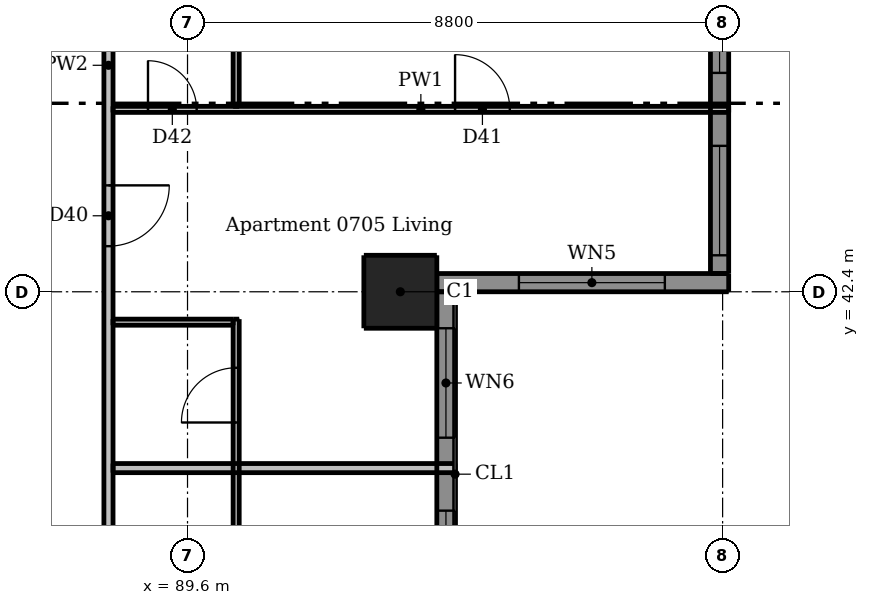
"""IFC4 building model, lengths in metres.
Left out: names, types, materials, properties, quantities, classifications, styles, units other than length and angle.
Written with IfcOpenShell. Run it as: python <this file> out.ifc"""

import sys

from ifc_helpers import new_model, si_unit, direction, frame, frame_2d, origin, origin_2d, place, context, subcontext, project, spatial, rectangle, extrude, element, fill, save


model = new_model("IFC4")
c1 = context("Model", 3, precision=1e-05, world=origin(), true_north=direction((0.0, 1.0)))
c2 = subcontext(c1, "Body", "Model", "MODEL_VIEW")
j1 = project(units=[si_unit("LENGTHUNIT", "METRE"), si_unit("PLANEANGLEUNIT", "RADIAN")], contexts=[c1])
p1 = place(None, origin())
s1 = spatial("IfcSite", under=j1, at=p1, CompositionType="ELEMENT")
p2 = place(p1, origin())
s2 = spatial("IfcBuilding", under=s1, at=p2, CompositionType="ELEMENT")
p3 = place(p2, frame((0.0, 0.0, 30.1)))
s3 = spatial("IfcBuildingStorey", under=s2, at=p3, CompositionType="ELEMENT", Elevation=30.1)
p4 = place(p3, frame((93.1, 42.4, 0.0), z_axis=(0.0, 0.0, 1.0), x_axis=(1.0, 0.0, 0.0)))
e1 = element("IfcColumn", 1, at=p4, inside=s3, PredefinedType="COLUMN", context=c2, shape_type="SweptSolid", body=[
    extrude(rectangle(XDim=1.2, YDim=1.2, at=origin_2d()), origin(), (0.0, 0.0, 1.0), 3.05),
])
p5 = place(p3, frame((93.7, 42.55, 0.0), z_axis=(0.0, 0.0, 1.0), x_axis=(1.0, 0.0, 0.0)))
e2 = element("IfcWall", 2, at=p5, inside=s3, PredefinedType="SOLIDWALL", context=c2, shape_type="SweptSolid", body=[
    extrude(rectangle(XDim=4.8, YDim=0.3, at=frame_2d((2.4, 0.0))), origin(), (0.0, 0.0, 1.0), 3.05),
])
p6 = place(p5, frame((1.35, 0.0, 0.15)))
e3 = element("IfcOpeningElement", 3, at=p6, cuts=e2, PredefinedType="OPENING", context=c2, shape_type="SweptSolid", body=[
    extrude(rectangle(XDim=2.4, YDim=2.1, at=frame_2d((1.2, 1.05))), frame((0.0, 0.16, 0.0), z_axis=(0.0, -1.0, 0.0), x_axis=(1.0, 0.0, 0.0)), (0.0, 0.0, 1.0), 0.32),
])
p7 = place(p3, frame((93.85, 36.49, 0.0), z_axis=(0.0, 0.0, 1.0), x_axis=(0.0, 1.0, 0.0)))
e4 = element("IfcWall", 4, at=p7, inside=s3, PredefinedType="SOLIDWALL", context=c2, shape_type="SweptSolid", body=[
    extrude(rectangle(XDim=5.91, YDim=0.3, at=frame_2d((2.955, 0.0))), origin(), (0.0, 0.0, 1.0), 3.05),
])
p8 = place(p7, frame((0.51, 0.0, 0.15)))
e5 = element("IfcOpeningElement", 5, at=p8, cuts=e4, PredefinedType="OPENING", context=c2, shape_type="SweptSolid", body=[
    extrude(rectangle(XDim=1.8, YDim=2.1, at=frame_2d((0.9, 1.05))), frame((0.0, 0.16, 0.0), z_axis=(0.0, -1.0, 0.0), x_axis=(1.0, 0.0, 0.0)), (0.0, 0.0, 1.0), 0.32),
])
p9 = place(p7, frame((3.51, 0.0, 0.15)))
e6 = element("IfcOpeningElement", 6, at=p9, cuts=e4, PredefinedType="OPENING", context=c2, shape_type="SweptSolid", body=[
    extrude(rectangle(XDim=1.8, YDim=2.1, at=frame_2d((0.9, 1.05))), frame((0.0, 0.16, 0.0), z_axis=(0.0, -1.0, 0.0), x_axis=(1.0, 0.0, 0.0)), (0.0, 0.0, 1.0), 0.32),
])
p10 = place(p3, frame((98.35, 42.7, 0.0), z_axis=(0.0, 0.0, 1.0), x_axis=(0.0, 1.0, 0.0)))
e7 = element("IfcWall", 7, at=p10, inside=s3, PredefinedType="SOLIDWALL", context=c2, shape_type="SweptSolid", body=[
    extrude(rectangle(XDim=5.7, YDim=0.3, at=frame_2d((2.85, 0.0))), origin(), (0.0, 0.0, 1.0), 3.05),
])
p11 = place(p10, frame((0.3, 0.0, 0.15)))
e8 = element("IfcOpeningElement", 8, at=p11, cuts=e7, PredefinedType="OPENING", context=c2, shape_type="SweptSolid", body=[
    extrude(rectangle(XDim=1.8, YDim=2.1, at=frame_2d((0.9, 1.05))), frame((0.0, 0.16, 0.0), z_axis=(0.0, -1.0, 0.0), x_axis=(1.0, 0.0, 0.0)), (0.0, 0.0, 1.0), 0.32),
])
p12 = place(p10, frame((3.3, 0.0, 0.15)))
e9 = element("IfcOpeningElement", 9, at=p12, cuts=e7, PredefinedType="OPENING", context=c2, shape_type="SweptSolid", body=[
    extrude(rectangle(XDim=1.8, YDim=2.1, at=frame_2d((0.9, 1.05))), frame((0.0, 0.16, 0.0), z_axis=(0.0, -1.0, 0.0), x_axis=(1.0, 0.0, 0.0)), (0.0, 0.0, 1.0), 0.32),
])
p13 = place(p3, frame((90.4, 33.45, 0.0), z_axis=(0.0, 0.0, 1.0), x_axis=(0.0, 1.0, 0.0)))
e10 = element("IfcWall", 10, at=p13, inside=s3, PredefinedType="PARTITIONING", context=c2, shape_type="SweptSolid", body=[
    extrude(rectangle(XDim=8.5, YDim=0.1, at=frame_2d((4.25, 0.0))), origin(), (0.0, 0.0, 1.0), 3.05),
])
p14 = place(p13, frame((3.8, 0.0, 0.0)))
e11 = element("IfcOpeningElement", 11, at=p14, cuts=e10, PredefinedType="OPENING", context=c2, shape_type="SweptSolid", body=[
    extrude(rectangle(XDim=0.8, YDim=2.1, at=frame_2d((0.4, 1.05))), frame((0.0, 0.06, 0.0), z_axis=(0.0, -1.0, 0.0), x_axis=(1.0, 0.0, 0.0)), (0.0, 0.0, 1.0), 0.12),
])
p15 = place(p13, frame((6.8, 0.0, 0.0)))
e12 = element("IfcOpeningElement", 12, at=p15, cuts=e10, PredefinedType="OPENING", context=c2, shape_type="SweptSolid", body=[
    extrude(rectangle(XDim=0.9, YDim=2.1, at=frame_2d((0.45, 1.05))), frame((0.0, 0.06, 0.0), z_axis=(0.0, -1.0, 0.0), x_axis=(1.0, 0.0, 0.0)), (0.0, 0.0, 1.0), 0.12),
])
p16 = place(p3, frame((90.4, 45.45, 0.0), z_axis=(0.0, 0.0, 1.0), x_axis=(0.0, 1.0, 0.0)))
e13 = element("IfcWall", 13, at=p16, inside=s3, PredefinedType="PARTITIONING", context=c2, shape_type="SweptSolid", body=[
    extrude(rectangle(XDim=2.875, YDim=0.1, at=frame_2d((1.438, 0.0))), origin(), (0.0, 0.0, 1.0), 3.05),
])
p17 = place(p3, frame((88.375, 45.4, 0.0), z_axis=(0.0, 0.0, 1.0), x_axis=(1.0, 0.0, 0.0)))
e14 = element("IfcWall", 14, at=p17, inside=s3, PredefinedType="PARTITIONING", context=c2, shape_type="SweptSolid", body=[
    extrude(rectangle(XDim=10.125, YDim=0.1, at=frame_2d((5.062, 0.0))), origin(), (0.0, 0.0, 1.0), 3.05),
])
p18 = place(p17, frame((5.625, 0.0, 0.0)))
e15 = element("IfcOpeningElement", 15, at=p18, cuts=e14, PredefinedType="OPENING", context=c2, shape_type="SweptSolid", body=[
    extrude(rectangle(XDim=0.9, YDim=2.1, at=frame_2d((0.45, 1.05))), frame((0.0, 0.06, 0.0), z_axis=(0.0, -1.0, 0.0), x_axis=(1.0, 0.0, 0.0)), (0.0, 0.0, 1.0), 0.12),
])
p19 = place(p17, frame((0.575, 0.0, 0.0)))
e16 = element("IfcOpeningElement", 16, at=p19, cuts=e14, PredefinedType="OPENING", context=c2, shape_type="SweptSolid", body=[
    extrude(rectangle(XDim=0.8, YDim=2.1, at=frame_2d((0.4, 1.05))), frame((0.0, 0.06, 0.0), z_axis=(0.0, -1.0, 0.0), x_axis=(1.0, 0.0, 0.0)), (0.0, 0.0, 1.0), 0.12),
])
p20 = place(p3, frame((88.375, 41.9, 0.0), z_axis=(0.0, 0.0, 1.0), x_axis=(1.0, 0.0, 0.0)))
e17 = element("IfcWall", 17, at=p20, inside=s3, PredefinedType="PARTITIONING", context=c2, shape_type="SweptSolid", body=[
    extrude(rectangle(XDim=1.975, YDim=0.1, at=frame_2d((0.988, 0.0))), origin(), (0.0, 0.0, 1.0), 3.05),
])
p21 = place(p3, frame((88.3, 60.475, 0.0), z_axis=(0.0, 0.0, 1.0), x_axis=(0.0, -1.0, 0.0)))
e18 = element("IfcWall", 18, at=p21, inside=s3, PredefinedType="PARTITIONING", context=c2, shape_type="SweptSolid", body=[
    extrude(rectangle(XDim=28.7, YDim=0.15, at=frame_2d((14.35, 0.0))), origin(), (0.0, 0.0, 1.0), 3.05),
])
p22 = place(p21, frame((27.425, 0.0, 0.0)))
e19 = element("IfcOpeningElement", 19, at=p22, cuts=e18, PredefinedType="OPENING", context=c2, shape_type="SweptSolid", body=[
    extrude(rectangle(XDim=1.0, YDim=2.1, at=frame_2d((0.5, 1.05))), frame((0.0, 0.085, 0.0), z_axis=(0.0, -1.0, 0.0), x_axis=(1.0, 0.0, 0.0)), (0.0, 0.0, 1.0), 0.17),
])
p23 = place(p21, frame((16.325, 0.0, 0.0)))
e20 = element("IfcOpeningElement", 20, at=p23, cuts=e18, PredefinedType="OPENING", context=c2, shape_type="SweptSolid", body=[
    extrude(rectangle(XDim=1.0, YDim=2.1, at=frame_2d((0.5, 1.05))), frame((0.0, 0.085, 0.0), z_axis=(0.0, -1.0, 0.0), x_axis=(1.0, 0.0, 0.0)), (0.0, 0.0, 1.0), 0.17),
])
p24 = place(p21, frame((5.525, 0.0, 0.0)))
e21 = element("IfcOpeningElement", 21, at=p24, cuts=e18, PredefinedType="OPENING", context=c2, shape_type="SweptSolid", body=[
    extrude(rectangle(XDim=1.0, YDim=2.1, at=frame_2d((0.5, 1.05))), frame((0.0, 0.085, 0.0), z_axis=(0.0, -1.0, 0.0), x_axis=(1.0, 0.0, 0.0)), (0.0, 0.0, 1.0), 0.17),
])
p25 = place(p3, frame((88.375, 39.5, 0.0), z_axis=(0.0, 0.0, 1.0), x_axis=(1.0, 0.0, 0.0)))
e22 = element("IfcWall", 22, at=p25, inside=s3, PredefinedType="PARTITIONING", context=c2, shape_type="SweptSolid", body=[
    extrude(rectangle(XDim=5.625, YDim=0.15, at=frame_2d((2.812, 0.0))), origin(), (0.0, 0.0, 1.0), 3.05),
])
p26 = place(p6, origin())
e23 = element("IfcWindow", 23, at=p26, inside=s3, PartitioningType="DOUBLE_PANEL_VERTICAL", PredefinedType="WINDOW", context=c2, shape_type="SweptSolid", body=[
    extrude(rectangle(XDim=2.4, YDim=2.1, at=frame_2d((1.2, 1.05))), frame((0.0, 0.03, 0.0), z_axis=(0.0, -1.0, 0.0), x_axis=(1.0, 0.0, 0.0)), (0.0, 0.0, 1.0), 0.06),
])
fill(e3, e23)
p27 = place(p8, origin())
e24 = element("IfcWindow", 24, at=p27, inside=s3, PartitioningType="DOUBLE_PANEL_VERTICAL", PredefinedType="WINDOW", context=c2, shape_type="SweptSolid", body=[
    extrude(rectangle(XDim=1.8, YDim=2.1, at=frame_2d((0.9, 1.05))), frame((0.0, 0.03, 0.0), z_axis=(0.0, -1.0, 0.0), x_axis=(1.0, 0.0, 0.0)), (0.0, 0.0, 1.0), 0.06),
])
fill(e5, e24)
p28 = place(p9, origin())
e25 = element("IfcWindow", 25, at=p28, inside=s3, PartitioningType="DOUBLE_PANEL_VERTICAL", PredefinedType="WINDOW", context=c2, shape_type="SweptSolid", body=[
    extrude(rectangle(XDim=1.8, YDim=2.1, at=frame_2d((0.9, 1.05))), frame((0.0, 0.03, 0.0), z_axis=(0.0, -1.0, 0.0), x_axis=(1.0, 0.0, 0.0)), (0.0, 0.0, 1.0), 0.06),
])
fill(e6, e25)
p29 = place(p11, origin())
e26 = element("IfcWindow", 26, at=p29, inside=s3, PartitioningType="DOUBLE_PANEL_VERTICAL", PredefinedType="WINDOW", context=c2, shape_type="SweptSolid", body=[
    extrude(rectangle(XDim=1.8, YDim=2.1, at=frame_2d((0.9, 1.05))), frame((0.0, 0.03, 0.0), z_axis=(0.0, -1.0, 0.0), x_axis=(1.0, 0.0, 0.0)), (0.0, 0.0, 1.0), 0.06),
])
fill(e8, e26)
p30 = place(p12, origin())
e27 = element("IfcWindow", 27, at=p30, inside=s3, PartitioningType="DOUBLE_PANEL_VERTICAL", PredefinedType="WINDOW", context=c2, shape_type="SweptSolid", body=[
    extrude(rectangle(XDim=1.8, YDim=2.1, at=frame_2d((0.9, 1.05))), frame((0.0, 0.03, 0.0), z_axis=(0.0, -1.0, 0.0), x_axis=(1.0, 0.0, 0.0)), (0.0, 0.0, 1.0), 0.06),
])
fill(e9, e27)
p31 = place(p23, origin())
e28 = element("IfcDoor", 28, at=p31, inside=s3, OperationType="SINGLE_SWING_LEFT", PredefinedType="DOOR", context=c2, shape_type="SweptSolid", body=[
    extrude(rectangle(XDim=1.0, YDim=2.1, at=frame_2d((0.5, 1.05))), frame((0.0, 0.025, 0.0), z_axis=(0.0, -1.0, 0.0), x_axis=(1.0, 0.0, 0.0)), (0.0, 0.0, 1.0), 0.05),
])
fill(e20, e28)
p32 = place(p15, origin())
e29 = element("IfcDoor", 29, at=p32, inside=s3, OperationType="SINGLE_SWING_LEFT", PredefinedType="DOOR", context=c2, shape_type="SweptSolid", body=[
    extrude(rectangle(XDim=0.9, YDim=2.1, at=frame_2d((0.45, 1.05))), frame((0.0, 0.025, 0.0), z_axis=(0.0, -1.0, 0.0), x_axis=(1.0, 0.0, 0.0)), (0.0, 0.0, 1.0), 0.05),
])
fill(e12, e29)
p33 = place(p18, origin())
e30 = element("IfcDoor", 30, at=p33, inside=s3, OperationType="SINGLE_SWING_LEFT", PredefinedType="DOOR", context=c2, shape_type="SweptSolid", body=[
    extrude(rectangle(XDim=0.9, YDim=2.1, at=frame_2d((0.45, 1.05))), frame((0.0, 0.025, 0.0), z_axis=(0.0, -1.0, 0.0), x_axis=(1.0, 0.0, 0.0)), (0.0, 0.0, 1.0), 0.05),
])
fill(e15, e30)
p34 = place(p19, origin())
e31 = element("IfcDoor", 31, at=p34, inside=s3, OperationType="SINGLE_SWING_LEFT", PredefinedType="DOOR", context=c2, shape_type="SweptSolid", body=[
    extrude(rectangle(XDim=0.8, YDim=2.1, at=frame_2d((0.4, 1.05))), frame((0.0, 0.025, 0.0), z_axis=(0.0, -1.0, 0.0), x_axis=(1.0, 0.0, 0.0)), (0.0, 0.0, 1.0), 0.05),
])
fill(e16, e31)
save(model, sys.argv[1])
